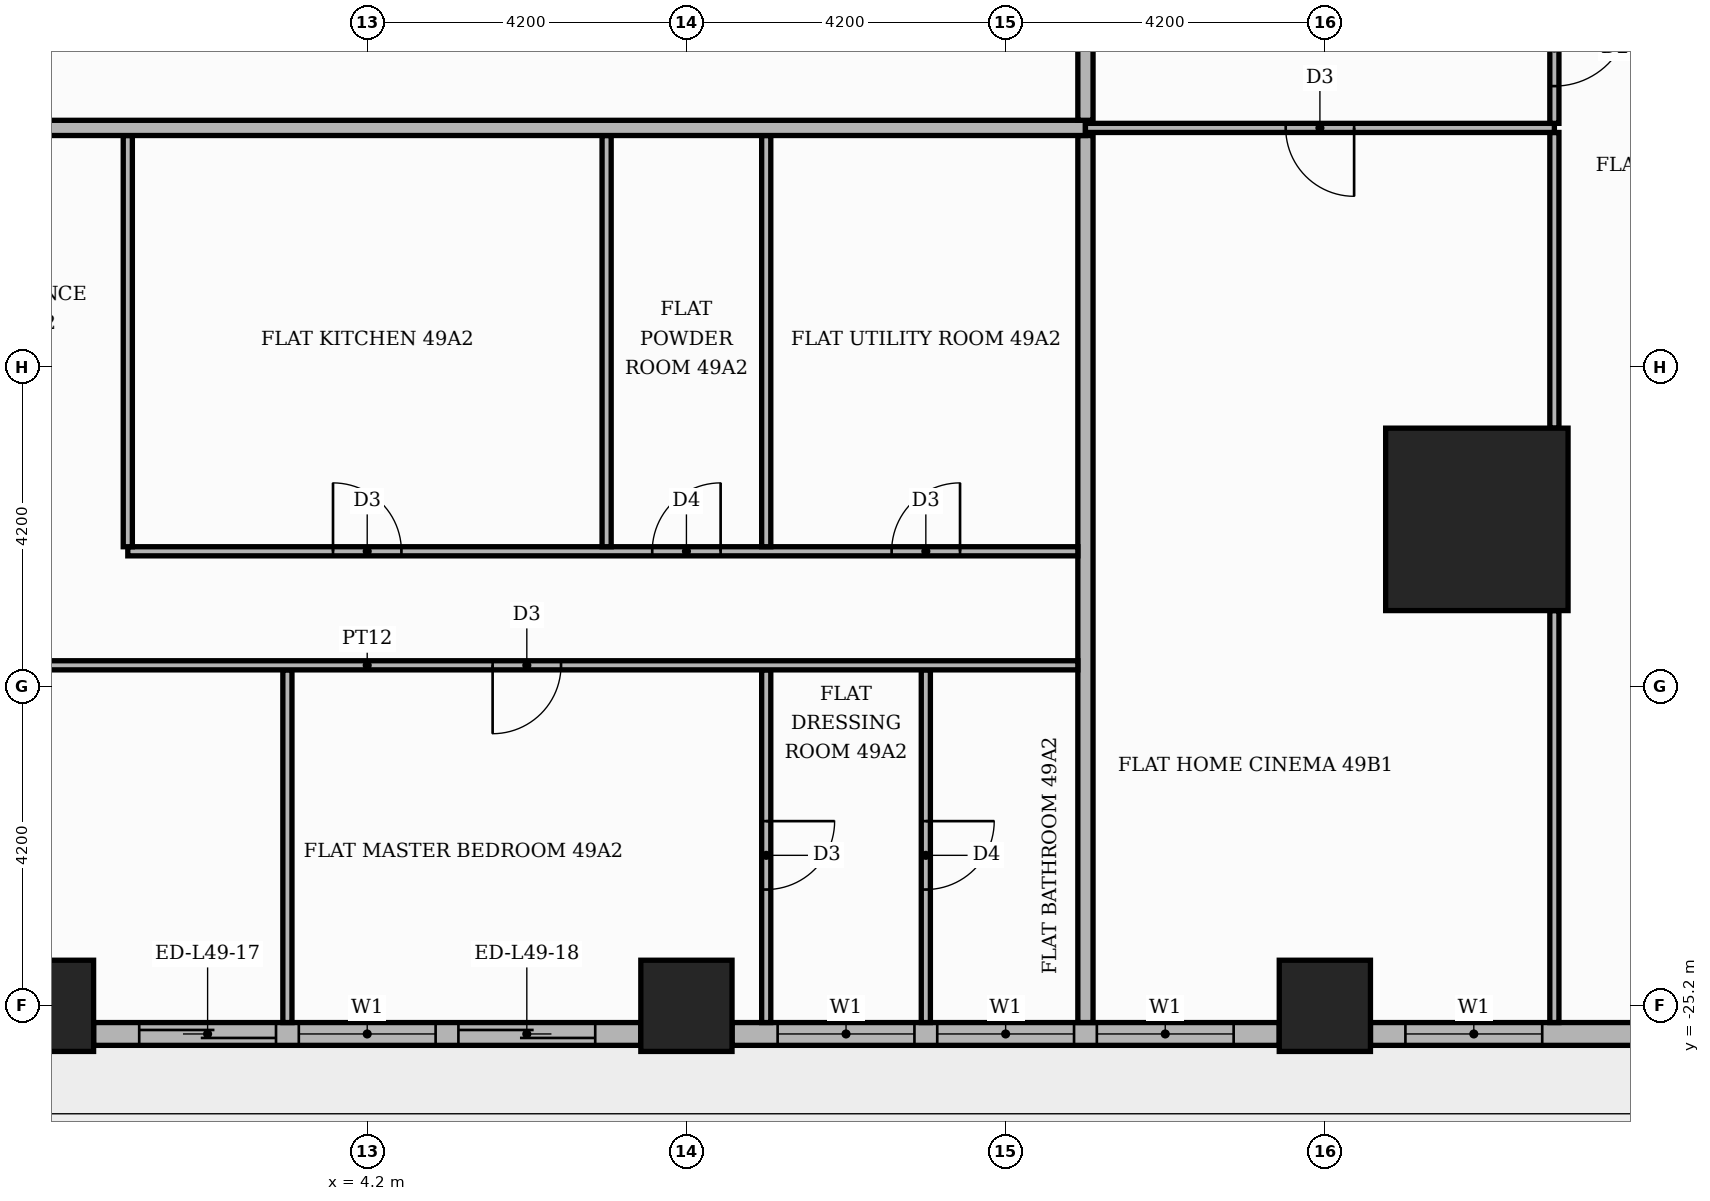
"""IFC4 building model, lengths in metres.
Left out: names, types, materials, properties, quantities, classifications, styles, units other than length and angle.
Written with IfcOpenShell. Run it as: python <this file> out.ifc"""

import sys

from ifc_helpers import new_model, si_unit, direction, frame, frame_2d, origin, origin_2d, place, context, subcontext, project, spatial, rectangle, extrude, element, fill, save


model = new_model("IFC4")
c1 = context("Model", 3, precision=1e-05, world=origin(), true_north=direction((0.0, 1.0)))
c2 = subcontext(c1, "Body", "Model", "MODEL_VIEW")
j1 = project(units=[si_unit("LENGTHUNIT", "METRE"), si_unit("PLANEANGLEUNIT", "RADIAN")], contexts=[c1])
p1 = place(None, origin())
s1 = spatial("IfcSite", under=j1, at=p1, CompositionType="ELEMENT")
p2 = place(p1, origin())
s2 = spatial("IfcBuilding", under=s1, at=p2, CompositionType="ELEMENT")
p3 = place(p2, frame((0.0, 0.0, 207.9)))
s3 = spatial("IfcBuildingStorey", under=s2, at=p3, CompositionType="ELEMENT", Elevation=207.9)
p4 = place(p3, frame((18.8, -18.8, 0.0), z_axis=(0.0, 0.0, 1.0), x_axis=(1.0, 0.0, 0.0)))
e1 = element("IfcColumn", 1, at=p4, inside=s3, PredefinedType="COLUMN", context=c2, shape_type="SweptSolid", body=[
    extrude(rectangle(XDim=2.4, YDim=2.4, at=origin_2d()), origin(), (0.0, 0.0, 1.0), 3.9),
])
for number, where, z_axis, x_axis in (
    (2, (0.0, -25.2, 0.0), (0.0, 0.0, 1.0), (1.0, 0.0, 0.0)),
    (3, (8.4, -25.2, 0.0), (0.0, 0.0, 1.0), (1.0, 0.0, 0.0)),
    (4, (16.8, -25.2, 0.0), (0.0, 0.0, 1.0), (1.0, 0.0, 0.0)),
):
    element("IfcColumn", number, at=place(p3, frame(where, z_axis=z_axis, x_axis=x_axis)), inside=s3, PredefinedType="COLUMN", context=c2, shape_type="SweptSolid", body=[
        extrude(rectangle(XDim=1.2, YDim=1.2, at=origin_2d()), origin(), (0.0, 0.0, 1.0), 3.9),
    ])
p5 = place(p3, frame((0.6, -25.57, 0.0), z_axis=(0.0, 0.0, 1.0), x_axis=(1.0, 0.0, 0.0)))
e5 = element("IfcWall", 5, at=p5, inside=s3, PredefinedType="STANDARD", context=c2, shape_type="SweptSolid", body=[
    extrude(rectangle(XDim=7.2, YDim=0.3, at=frame_2d((3.6, 0.0))), origin(), (0.0, 0.0, 1.0), 3.48),
])
p6 = place(p5, frame((0.6, 0.0, 0.0)))
e6 = element("IfcOpeningElement", 6, at=p6, cuts=e5, PredefinedType="OPENING", context=c2, shape_type="SweptSolid", body=[
    extrude(rectangle(XDim=1.8, YDim=2.4, at=frame_2d((0.9, 1.2))), frame((0.0, 0.16, 0.0), z_axis=(0.0, -1.0, 0.0), x_axis=(1.0, 0.0, 0.0)), (0.0, 0.0, 1.0), 0.32),
])
p7 = place(p5, frame((2.7, 0.0, 0.9)))
e7 = element("IfcOpeningElement", 7, at=p7, cuts=e5, PredefinedType="OPENING", context=c2, shape_type="SweptSolid", body=[
    extrude(rectangle(XDim=1.8, YDim=2.1, at=frame_2d((0.9, 1.05))), frame((0.0, 0.16, 0.0), z_axis=(0.0, -1.0, 0.0), x_axis=(1.0, 0.0, 0.0)), (0.0, 0.0, 1.0), 0.32),
])
p8 = place(p5, frame((4.8, 0.0, 0.0)))
e8 = element("IfcOpeningElement", 8, at=p8, cuts=e5, PredefinedType="OPENING", context=c2, shape_type="SweptSolid", body=[
    extrude(rectangle(XDim=1.8, YDim=2.4, at=frame_2d((0.9, 1.2))), frame((0.0, 0.16, 0.0), z_axis=(0.0, -1.0, 0.0), x_axis=(1.0, 0.0, 0.0)), (0.0, 0.0, 1.0), 0.32),
])
p9 = place(p3, frame((9.0, -25.57, 0.0), z_axis=(0.0, 0.0, 1.0), x_axis=(1.0, 0.0, 0.0)))
e9 = element("IfcWall", 9, at=p9, inside=s3, PredefinedType="STANDARD", context=c2, shape_type="SweptSolid", body=[
    extrude(rectangle(XDim=7.2, YDim=0.3, at=frame_2d((3.6, 0.0))), origin(), (0.0, 0.0, 1.0), 3.48),
])
p10 = place(p9, frame((0.6, 0.0, 0.9)))
e10 = element("IfcOpeningElement", 10, at=p10, cuts=e9, PredefinedType="OPENING", context=c2, shape_type="SweptSolid", body=[
    extrude(rectangle(XDim=1.8, YDim=2.1, at=frame_2d((0.9, 1.05))), frame((0.0, 0.16, 0.0), z_axis=(0.0, -1.0, 0.0), x_axis=(1.0, 0.0, 0.0)), (0.0, 0.0, 1.0), 0.32),
])
p11 = place(p9, frame((2.7, 0.0, 0.9)))
e11 = element("IfcOpeningElement", 11, at=p11, cuts=e9, PredefinedType="OPENING", context=c2, shape_type="SweptSolid", body=[
    extrude(rectangle(XDim=1.8, YDim=2.1, at=frame_2d((0.9, 1.05))), frame((0.0, 0.16, 0.0), z_axis=(0.0, -1.0, 0.0), x_axis=(1.0, 0.0, 0.0)), (0.0, 0.0, 1.0), 0.32),
])
p12 = place(p9, frame((4.8, 0.0, 0.9)))
e12 = element("IfcOpeningElement", 12, at=p12, cuts=e9, PredefinedType="OPENING", context=c2, shape_type="SweptSolid", body=[
    extrude(rectangle(XDim=1.8, YDim=2.1, at=frame_2d((0.9, 1.05))), frame((0.0, 0.16, 0.0), z_axis=(0.0, -1.0, 0.0), x_axis=(1.0, 0.0, 0.0)), (0.0, 0.0, 1.0), 0.32),
])
p13 = place(p3, frame((17.4, -25.57, 0.0), z_axis=(0.0, 0.0, 1.0), x_axis=(1.0, 0.0, 0.0)))
e13 = element("IfcWall", 13, at=p13, inside=s3, PredefinedType="STANDARD", context=c2, shape_type="SweptSolid", body=[
    extrude(rectangle(XDim=3.82, YDim=0.3, at=frame_2d((1.91, 0.0))), origin(), (0.0, 0.0, 1.0), 3.48),
])
p14 = place(p13, frame((0.46, 0.0, 0.9)))
e14 = element("IfcOpeningElement", 14, at=p14, cuts=e13, PredefinedType="OPENING", context=c2, shape_type="SweptSolid", body=[
    extrude(rectangle(XDim=1.8, YDim=2.1, at=frame_2d((0.9, 1.05))), frame((0.0, 0.16, 0.0), z_axis=(0.0, -1.0, 0.0), x_axis=(1.0, 0.0, 0.0)), (0.0, 0.0, 1.0), 0.32),
])
p15 = place(p3, frame((3.15, -25.42, 0.0), z_axis=(0.0, 0.0, 1.0), x_axis=(0.0, 1.0, 0.0)))
e15 = element("IfcWall", 15, at=p15, inside=s3, PredefinedType="PARTITIONING", context=c2, shape_type="SweptSolid", body=[
    extrude(rectangle(XDim=4.64, YDim=0.12, at=frame_2d((2.32, 0.0))), origin(), (0.0, 0.0, 1.0), 3.48),
])
p16 = place(p3, frame((9.45, -25.42, 0.0), z_axis=(0.0, 0.0, 1.0), x_axis=(0.0, 1.0, 0.0)))
e16 = element("IfcWall", 16, at=p16, inside=s3, PredefinedType="PARTITIONING", context=c2, shape_type="SweptSolid", body=[
    extrude(rectangle(XDim=4.64, YDim=0.12, at=frame_2d((2.32, 0.0))), origin(), (0.0, 0.0, 1.0), 3.48),
])
p17 = place(p16, frame((1.75, 0.0, 0.0)))
e17 = element("IfcOpeningElement", 17, at=p17, cuts=e16, PredefinedType="OPENING", context=c2, shape_type="SweptSolid", body=[
    extrude(rectangle(XDim=0.9, YDim=2.1, at=frame_2d((0.45, 1.05))), frame((0.0, 0.07, 0.0), z_axis=(0.0, -1.0, 0.0), x_axis=(1.0, 0.0, 0.0)), (0.0, 0.0, 1.0), 0.14),
])
p18 = place(p3, frame((11.55, -25.42, 0.0), z_axis=(0.0, 0.0, 1.0), x_axis=(0.0, 1.0, 0.0)))
e18 = element("IfcWall", 18, at=p18, inside=s3, PredefinedType="PARTITIONING", context=c2, shape_type="SweptSolid", body=[
    extrude(rectangle(XDim=4.64, YDim=0.12, at=frame_2d((2.32, 0.0))), origin(), (0.0, 0.0, 1.0), 3.48),
])
p19 = place(p18, frame((1.75, 0.0, 0.0)))
e19 = element("IfcOpeningElement", 19, at=p19, cuts=e18, PredefinedType="OPENING", context=c2, shape_type="SweptSolid", body=[
    extrude(rectangle(XDim=0.9, YDim=2.1, at=frame_2d((0.45, 1.05))), frame((0.0, 0.07, 0.0), z_axis=(0.0, -1.0, 0.0), x_axis=(1.0, 0.0, 0.0)), (0.0, 0.0, 1.0), 0.14),
])
p20 = place(p3, frame((13.65, -25.42, 0.0), z_axis=(0.0, 0.0, 1.0), x_axis=(0.0, 1.0, 0.0)))
e20 = element("IfcWall", 20, at=p20, inside=s3, PredefinedType="PARTITIONING", context=c2, shape_type="SweptSolid", body=[
    extrude(rectangle(XDim=11.67, YDim=0.2, at=frame_2d((5.835, 0.0))), origin(), (0.0, 0.0, 1.0), 3.48),
])
p21 = place(p3, frame((19.82, -25.42, 0.0), z_axis=(0.0, 0.0, 1.0), x_axis=(0.0, 1.0, 0.0)))
e21 = element("IfcWall", 21, at=p21, inside=s3, PredefinedType="PARTITIONING", context=c2, shape_type="SweptSolid", body=[
    extrude(rectangle(XDim=5.42, YDim=0.12, at=frame_2d((2.71, 0.0))), origin(), (0.0, 0.0, 1.0), 3.48),
])
p22 = place(p3, frame((-5.15, -20.72, 0.0), z_axis=(0.0, 0.0, 1.0), x_axis=(1.0, 0.0, 0.0)))
e22 = element("IfcWall", 22, at=p22, inside=s3, PredefinedType="PARTITIONING", context=c2, shape_type="SweptSolid", body=[
    extrude(rectangle(XDim=18.7, YDim=0.12, at=frame_2d((9.35, 0.0))), origin(), (0.0, 0.0, 1.0), 3.48),
])
p23 = place(p22, frame((3.6, 0.0, 0.0)))
e23 = element("IfcOpeningElement", 23, at=p23, cuts=e22, PredefinedType="OPENING", context=c2, shape_type="SweptSolid", body=[
    extrude(rectangle(XDim=1.0, YDim=2.1, at=frame_2d((0.5, 1.05))), frame((0.0, 0.07, 0.0), z_axis=(0.0, -1.0, 0.0), x_axis=(1.0, 0.0, 0.0)), (0.0, 0.0, 1.0), 0.14),
])
p24 = place(p22, frame((11.0, 0.0, 0.0)))
e24 = element("IfcOpeningElement", 24, at=p24, cuts=e22, PredefinedType="OPENING", context=c2, shape_type="SweptSolid", body=[
    extrude(rectangle(XDim=0.9, YDim=2.1, at=frame_2d((0.45, 1.05))), frame((0.0, 0.07, 0.0), z_axis=(0.0, -1.0, 0.0), x_axis=(1.0, 0.0, 0.0)), (0.0, 0.0, 1.0), 0.14),
])
p25 = place(p3, frame((1.05, -19.22, 0.0), z_axis=(0.0, 0.0, 1.0), x_axis=(1.0, 0.0, 0.0)))
e25 = element("IfcWall", 25, at=p25, inside=s3, PredefinedType="PARTITIONING", context=c2, shape_type="SweptSolid", body=[
    extrude(rectangle(XDim=12.5, YDim=0.12, at=frame_2d((6.25, 0.0))), origin(), (0.0, 0.0, 1.0), 3.48),
])
p26 = place(p25, frame((2.7, 0.0, 0.0)))
e26 = element("IfcOpeningElement", 26, at=p26, cuts=e25, PredefinedType="OPENING", context=c2, shape_type="SweptSolid", body=[
    extrude(rectangle(XDim=0.9, YDim=2.1, at=frame_2d((0.45, 1.05))), frame((0.0, 0.07, 0.0), z_axis=(0.0, -1.0, 0.0), x_axis=(1.0, 0.0, 0.0)), (0.0, 0.0, 1.0), 0.14),
])
p27 = place(p25, frame((6.9, 0.0, 0.0)))
e27 = element("IfcOpeningElement", 27, at=p27, cuts=e25, PredefinedType="OPENING", context=c2, shape_type="SweptSolid", body=[
    extrude(rectangle(XDim=0.9, YDim=2.1, at=frame_2d((0.45, 1.05))), frame((0.0, 0.07, 0.0), z_axis=(0.0, -1.0, 0.0), x_axis=(1.0, 0.0, 0.0)), (0.0, 0.0, 1.0), 0.14),
])
p28 = place(p25, frame((10.05, 0.0, 0.0)))
e28 = element("IfcOpeningElement", 28, at=p28, cuts=e25, PredefinedType="OPENING", context=c2, shape_type="SweptSolid", body=[
    extrude(rectangle(XDim=0.9, YDim=2.1, at=frame_2d((0.45, 1.05))), frame((0.0, 0.07, 0.0), z_axis=(0.0, -1.0, 0.0), x_axis=(1.0, 0.0, 0.0)), (0.0, 0.0, 1.0), 0.14),
])
for number, where, z_axis, x_axis in (
    (29, (1.05, -19.16, 0.0), (0.0, 0.0, 1.0), (0.0, 1.0, 0.0)),
    (30, (7.35, -19.16, 0.0), (0.0, 0.0, 1.0), (0.0, 1.0, 0.0)),
    (31, (9.45, -19.16, 0.0), (0.0, 0.0, 1.0), (0.0, 1.0, 0.0)),
):
    element("IfcWall", number, at=place(p3, frame(where, z_axis=z_axis, x_axis=x_axis)), inside=s3, PredefinedType="PARTITIONING", context=c2, shape_type="SweptSolid", body=[
        extrude(rectangle(XDim=5.41, YDim=0.12, at=frame_2d((2.705, 0.0))), origin(), (0.0, 0.0, 1.0), 3.48),
    ])
p29 = place(p3, frame((19.82, -17.6, 0.0), z_axis=(0.0, 0.0, 1.0), x_axis=(0.0, 1.0, 0.0)))
e32 = element("IfcWall", 32, at=p29, inside=s3, PredefinedType="PARTITIONING", context=c2, shape_type="SweptSolid", body=[
    extrude(rectangle(XDim=3.89, YDim=0.12, at=frame_2d((1.945, 0.0))), origin(), (0.0, 0.0, 1.0), 3.48),
])
p30 = place(p3, frame((-25.42, -13.65, 0.0), z_axis=(0.0, 0.0, 1.0), x_axis=(1.0, 0.0, 0.0)))
e33 = element("IfcWall", 33, at=p30, inside=s3, PredefinedType="PARTITIONING", context=c2, shape_type="SweptSolid", body=[
    extrude(rectangle(XDim=39.07, YDim=0.2, at=frame_2d((19.535, 0.0))), origin(), (0.0, 0.0, 1.0), 3.48),
])
p31 = place(p30, frame((13.32, 0.0, 0.0)))
e34 = element("IfcOpeningElement", 34, at=p31, cuts=e33, PredefinedType="OPENING", context=c2, shape_type="SweptSolid", body=[
    extrude(rectangle(XDim=1.1, YDim=2.4, at=frame_2d((0.55, 1.2))), frame((0.0, 0.11, 0.0), z_axis=(0.0, -1.0, 0.0), x_axis=(1.0, 0.0, 0.0)), (0.0, 0.0, 1.0), 0.22),
])
p32 = place(p30, frame((23.82, 0.0, 0.0)))
e35 = element("IfcOpeningElement", 35, at=p32, cuts=e33, PredefinedType="OPENING", context=c2, shape_type="SweptSolid", body=[
    extrude(rectangle(XDim=1.1, YDim=2.4, at=frame_2d((0.55, 1.2))), frame((0.0, 0.11, 0.0), z_axis=(0.0, -1.0, 0.0), x_axis=(1.0, 0.0, 0.0)), (0.0, 0.0, 1.0), 0.22),
])
p33 = place(p3, frame((13.65, -13.65, 0.0), z_axis=(0.0, 0.0, 1.0), x_axis=(1.0, 0.0, 0.0)))
e36 = element("IfcWall", 36, at=p33, inside=s3, PredefinedType="PARTITIONING", context=c2, shape_type="SweptSolid", body=[
    extrude(rectangle(XDim=6.17, YDim=0.12, at=frame_2d((3.085, 0.0))), origin(), (0.0, 0.0, 1.0), 3.48),
])
p34 = place(p33, frame((2.635, 0.0, 0.0)))
e37 = element("IfcOpeningElement", 37, at=p34, cuts=e36, PredefinedType="OPENING", context=c2, shape_type="SweptSolid", body=[
    extrude(rectangle(XDim=0.9, YDim=2.1, at=frame_2d((0.45, 1.05))), frame((0.0, 0.07, 0.0), z_axis=(0.0, -1.0, 0.0), x_axis=(1.0, 0.0, 0.0)), (0.0, 0.0, 1.0), 0.14),
])
p35 = place(p3, frame((19.82, -13.59, 0.0), z_axis=(0.0, 0.0, 1.0), x_axis=(0.0, 1.0, 0.0)))
e38 = element("IfcWall", 38, at=p35, inside=s3, PredefinedType="PARTITIONING", context=c2, shape_type="SweptSolid", body=[
    extrude(rectangle(XDim=1.98, YDim=0.12, at=frame_2d((0.99, 0.0))), origin(), (0.0, 0.0, 1.0), 3.48),
])
p36 = place(p35, frame((0.49, 0.0, 0.0)))
e39 = element("IfcOpeningElement", 39, at=p36, cuts=e38, PredefinedType="OPENING", context=c2, shape_type="SweptSolid", body=[
    extrude(rectangle(XDim=1.0, YDim=2.1, at=frame_2d((0.5, 1.05))), frame((0.0, 0.07, 0.0), z_axis=(0.0, -1.0, 0.0), x_axis=(1.0, 0.0, 0.0)), (0.0, 0.0, 1.0), 0.14),
])
p37 = place(p3, frame((13.65, -13.55, 0.0), z_axis=(0.0, 0.0, 1.0), x_axis=(0.0, 1.0, 0.0)))
e40 = element("IfcWall", 40, at=p37, inside=s3, PredefinedType="PARTITIONING", context=c2, shape_type="SweptSolid", body=[
    extrude(rectangle(XDim=2.45, YDim=0.2, at=frame_2d((1.225, 0.0))), origin(), (0.0, 0.0, 1.0), 3.48),
])
p38 = place(p6, origin())
e41 = element("IfcDoor", 41, at=p38, inside=s3, OperationType="SLIDING_TO_LEFT", PredefinedType="DOOR", context=c2, shape_type="SweptSolid", body=[
    extrude(rectangle(XDim=1.8, YDim=2.4, at=frame_2d((0.9, 1.2))), frame((0.0, 0.025, 0.0), z_axis=(0.0, -1.0, 0.0), x_axis=(1.0, 0.0, 0.0)), (0.0, 0.0, 1.0), 0.05),
])
fill(e6, e41)
p39 = place(p7, origin())
e42 = element("IfcWindow", 42, at=p39, inside=s3, PartitioningType="SINGLE_PANEL", PredefinedType="WINDOW", context=c2, shape_type="SweptSolid", body=[
    extrude(rectangle(XDim=1.8, YDim=2.1, at=frame_2d((0.9, 1.05))), frame((0.0, 0.03, 0.0), z_axis=(0.0, -1.0, 0.0), x_axis=(1.0, 0.0, 0.0)), (0.0, 0.0, 1.0), 0.06),
])
fill(e7, e42)
p40 = place(p8, origin())
e43 = element("IfcDoor", 43, at=p40, inside=s3, OperationType="SLIDING_TO_RIGHT", PredefinedType="DOOR", context=c2, shape_type="SweptSolid", body=[
    extrude(rectangle(XDim=1.8, YDim=2.4, at=frame_2d((0.9, 1.2))), frame((0.0, 0.025, 0.0), z_axis=(0.0, -1.0, 0.0), x_axis=(1.0, 0.0, 0.0)), (0.0, 0.0, 1.0), 0.05),
])
fill(e8, e43)
p41 = place(p10, origin())
e44 = element("IfcWindow", 44, at=p41, inside=s3, PartitioningType="SINGLE_PANEL", PredefinedType="WINDOW", context=c2, shape_type="SweptSolid", body=[
    extrude(rectangle(XDim=1.8, YDim=2.1, at=frame_2d((0.9, 1.05))), frame((0.0, 0.03, 0.0), z_axis=(0.0, -1.0, 0.0), x_axis=(1.0, 0.0, 0.0)), (0.0, 0.0, 1.0), 0.06),
])
fill(e10, e44)
p42 = place(p11, origin())
e45 = element("IfcWindow", 45, at=p42, inside=s3, PartitioningType="SINGLE_PANEL", PredefinedType="WINDOW", context=c2, shape_type="SweptSolid", body=[
    extrude(rectangle(XDim=1.8, YDim=2.1, at=frame_2d((0.9, 1.05))), frame((0.0, 0.03, 0.0), z_axis=(0.0, -1.0, 0.0), x_axis=(1.0, 0.0, 0.0)), (0.0, 0.0, 1.0), 0.06),
])
fill(e11, e45)
p43 = place(p12, origin())
e46 = element("IfcWindow", 46, at=p43, inside=s3, PartitioningType="SINGLE_PANEL", PredefinedType="WINDOW", context=c2, shape_type="SweptSolid", body=[
    extrude(rectangle(XDim=1.8, YDim=2.1, at=frame_2d((0.9, 1.05))), frame((0.0, 0.03, 0.0), z_axis=(0.0, -1.0, 0.0), x_axis=(1.0, 0.0, 0.0)), (0.0, 0.0, 1.0), 0.06),
])
fill(e12, e46)
p44 = place(p14, origin())
e47 = element("IfcWindow", 47, at=p44, inside=s3, PartitioningType="SINGLE_PANEL", PredefinedType="WINDOW", context=c2, shape_type="SweptSolid", body=[
    extrude(rectangle(XDim=1.8, YDim=2.1, at=frame_2d((0.9, 1.05))), frame((0.0, 0.03, 0.0), z_axis=(0.0, -1.0, 0.0), x_axis=(1.0, 0.0, 0.0)), (0.0, 0.0, 1.0), 0.06),
])
fill(e14, e47)
p45 = place(p26, origin())
e48 = element("IfcDoor", 48, at=p45, inside=s3, OperationType="SINGLE_SWING_LEFT", PredefinedType="DOOR", context=c2, shape_type="SweptSolid", body=[
    extrude(rectangle(XDim=0.9, YDim=2.1, at=frame_2d((0.45, 1.05))), frame((0.0, 0.025, 0.0), z_axis=(0.0, -1.0, 0.0), x_axis=(1.0, 0.0, 0.0)), (0.0, 0.0, 1.0), 0.05),
])
fill(e26, e48)
p46 = place(p27, origin())
e49 = element("IfcDoor", 49, at=p46, inside=s3, OperationType="SINGLE_SWING_RIGHT", PredefinedType="DOOR", context=c2, shape_type="SweptSolid", body=[
    extrude(rectangle(XDim=0.9, YDim=2.1, at=frame_2d((0.45, 1.05))), frame((0.0, 0.025, 0.0), z_axis=(0.0, -1.0, 0.0), x_axis=(1.0, 0.0, 0.0)), (0.0, 0.0, 1.0), 0.05),
])
fill(e27, e49)
p47 = place(p28, origin())
e50 = element("IfcDoor", 50, at=p47, inside=s3, OperationType="SINGLE_SWING_RIGHT", PredefinedType="DOOR", context=c2, shape_type="SweptSolid", body=[
    extrude(rectangle(XDim=0.9, YDim=2.1, at=frame_2d((0.45, 1.05))), frame((0.0, 0.025, 0.0), z_axis=(0.0, -1.0, 0.0), x_axis=(1.0, 0.0, 0.0)), (0.0, 0.0, 1.0), 0.05),
])
fill(e28, e50)
p48 = place(p24, frame((0.9, 0.0, 0.0), z_axis=(0.0, 0.0, 1.0), x_axis=(-1.0, 0.0, 0.0)))
e51 = element("IfcDoor", 51, at=p48, inside=s3, OperationType="SINGLE_SWING_LEFT", PredefinedType="DOOR", context=c2, shape_type="SweptSolid", body=[
    extrude(rectangle(XDim=0.9, YDim=2.1, at=frame_2d((0.45, 1.05))), frame((0.0, 0.025, 0.0), z_axis=(0.0, -1.0, 0.0), x_axis=(1.0, 0.0, 0.0)), (0.0, 0.0, 1.0), 0.05),
])
fill(e24, e51)
p49 = place(p17, frame((0.9, 0.0, 0.0), z_axis=(0.0, 0.0, 1.0), x_axis=(-1.0, 0.0, 0.0)))
e52 = element("IfcDoor", 52, at=p49, inside=s3, OperationType="SINGLE_SWING_RIGHT", PredefinedType="DOOR", context=c2, shape_type="SweptSolid", body=[
    extrude(rectangle(XDim=0.9, YDim=2.1, at=frame_2d((0.45, 1.05))), frame((0.0, 0.025, 0.0), z_axis=(0.0, -1.0, 0.0), x_axis=(1.0, 0.0, 0.0)), (0.0, 0.0, 1.0), 0.05),
])
fill(e17, e52)
p50 = place(p19, frame((0.9, 0.0, 0.0), z_axis=(0.0, 0.0, 1.0), x_axis=(-1.0, 0.0, 0.0)))
e53 = element("IfcDoor", 53, at=p50, inside=s3, OperationType="SINGLE_SWING_RIGHT", PredefinedType="DOOR", context=c2, shape_type="SweptSolid", body=[
    extrude(rectangle(XDim=0.9, YDim=2.1, at=frame_2d((0.45, 1.05))), frame((0.0, 0.025, 0.0), z_axis=(0.0, -1.0, 0.0), x_axis=(1.0, 0.0, 0.0)), (0.0, 0.0, 1.0), 0.05),
])
fill(e19, e53)
p51 = place(p34, frame((0.9, 0.0, 0.0), z_axis=(0.0, 0.0, 1.0), x_axis=(-1.0, 0.0, 0.0)))
e54 = element("IfcDoor", 54, at=p51, inside=s3, OperationType="SINGLE_SWING_RIGHT", PredefinedType="DOOR", context=c2, shape_type="SweptSolid", body=[
    extrude(rectangle(XDim=0.9, YDim=2.1, at=frame_2d((0.45, 1.05))), frame((0.0, 0.025, 0.0), z_axis=(0.0, -1.0, 0.0), x_axis=(1.0, 0.0, 0.0)), (0.0, 0.0, 1.0), 0.05),
])
fill(e37, e54)
p52 = place(p36, frame((1.0, 0.0, 0.0), z_axis=(0.0, 0.0, 1.0), x_axis=(-1.0, 0.0, 0.0)))
e55 = element("IfcDoor", 55, at=p52, inside=s3, OperationType="SINGLE_SWING_RIGHT", PredefinedType="DOOR", context=c2, shape_type="SweptSolid", body=[
    extrude(rectangle(XDim=1.0, YDim=2.1, at=frame_2d((0.5, 1.05))), frame((0.0, 0.025, 0.0), z_axis=(0.0, -1.0, 0.0), x_axis=(1.0, 0.0, 0.0)), (0.0, 0.0, 1.0), 0.05),
])
fill(e39, e55)
save(model, sys.argv[1])
